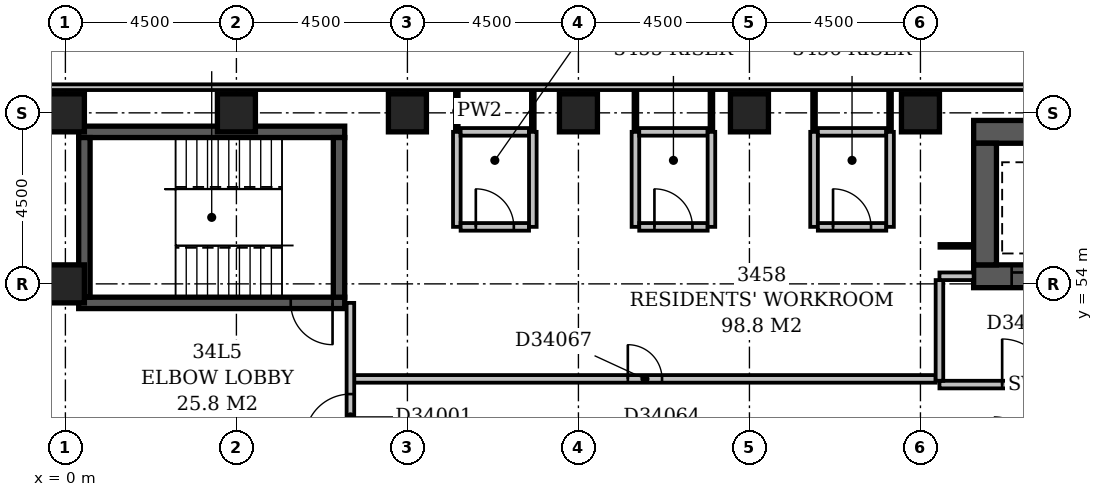
"""IFC4 building model, lengths in metres.
Left out: names, types, materials, properties, quantities, classifications, styles, units other than length and angle.
Written with IfcOpenShell. Run it as: python <this file> out.ifc"""

import sys

from ifc_helpers import new_model, si_unit, direction, frame, frame_2d, origin, origin_2d, place, context, subcontext, project, spatial, rectangle, extrude, element, fill, save


model = new_model("IFC4")
c1 = context("Model", 3, precision=1e-05, world=origin(), true_north=direction((0.0, 1.0)))
c2 = subcontext(c1, "Body", "Model", "MODEL_VIEW")
j1 = project(units=[si_unit("LENGTHUNIT", "METRE"), si_unit("PLANEANGLEUNIT", "RADIAN")], contexts=[c1])
p1 = place(None, origin())
s1 = spatial("IfcSite", under=j1, at=p1, CompositionType="ELEMENT")
p2 = place(p1, origin())
s2 = spatial("IfcBuilding", under=s1, at=p2, CompositionType="ELEMENT")
p3 = place(p2, frame((0.0, 0.0, 137.6)))
s3 = spatial("IfcBuildingStorey", under=s2, at=p3, CompositionType="ELEMENT", Elevation=137.6)
p4 = place(p3, frame((0.35, 53.5, -0.3), z_axis=(0.0, 0.0, 1.0), x_axis=(1.0, 0.0, 0.0)))
e1 = element("IfcWall", 1, at=p4, inside=s3, PredefinedType="SHEAR", context=c2, shape_type="SweptSolid", body=[
    extrude(rectangle(XDim=7.0, YDim=0.3, at=frame_2d((3.5, 0.0))), origin(), (0.0, 0.0, 1.0), 3.6),
])
p5 = place(p4, frame((5.58, 0.0, 0.3)))
e2 = element("IfcOpeningElement", 2, at=p5, cuts=e1, PredefinedType="OPENING", context=c2, shape_type="SweptSolid", body=[
    extrude(rectangle(XDim=1.1, YDim=2.1, at=frame_2d((0.55, 1.05))), frame((0.0, 0.162, 0.0), z_axis=(0.0, -1.0, 0.0), x_axis=(1.0, 0.0, 0.0)), (0.0, 0.0, 1.0), 0.324),
])
p6 = place(p3, frame((0.35, 58.0, -0.3), z_axis=(0.0, 0.0, 1.0), x_axis=(1.0, 0.0, 0.0)))
e3 = element("IfcWall", 3, at=p6, inside=s3, PredefinedType="SHEAR", context=c2, shape_type="SweptSolid", body=[
    extrude(rectangle(XDim=7.0, YDim=0.3, at=frame_2d((3.5, 0.0))), origin(), (0.0, 0.0, 1.0), 3.6),
])
for number, where, z_axis, x_axis in (
    (4, (0.5, 53.65, -0.3), (0.0, 0.0, 1.0), (0.0, 1.0, 0.0)),
    (5, (7.2, 53.65, -0.3), (0.0, 0.0, 1.0), (0.0, 1.0, 0.0)),
):
    element("IfcWall", number, at=place(p3, frame(where, z_axis=z_axis, x_axis=x_axis)), inside=s3, PredefinedType="SHEAR", context=c2, shape_type="SweptSolid", body=[
        extrude(rectangle(XDim=4.2, YDim=0.3, at=frame_2d((2.1, 0.0))), origin(), (0.0, 0.0, 1.0), 3.6),
    ])
p7 = place(p3, frame((23.9, 54.2, -0.3), z_axis=(0.0, 0.0, 1.0), x_axis=(1.0, 0.0, 0.0)))
e6 = element("IfcWall", 6, at=p7, inside=s3, PredefinedType="SHEAR", context=c2, shape_type="SweptSolid", body=[
    extrude(rectangle(XDim=3.1, YDim=0.6, at=frame_2d((1.55, 0.0))), origin(), (0.0, 0.0, 1.0), 3.6),
])
p8 = place(p7, frame((1.0, 0.0, 0.3)))
e7 = element("IfcOpeningElement", 7, at=p8, cuts=e6, PredefinedType="OPENING", context=c2, shape_type="SweptSolid", body=[
    extrude(rectangle(XDim=1.1, YDim=2.1, at=frame_2d((0.55, 1.05))), frame((0.0, 0.312, 0.0), z_axis=(0.0, -1.0, 0.0), x_axis=(1.0, 0.0, 0.0)), (0.0, 0.0, 1.0), 0.624),
])
p9 = place(p3, frame((23.9, 58.0, -0.3), z_axis=(0.0, 0.0, 1.0), x_axis=(1.0, 0.0, 0.0)))
e8 = element("IfcWall", 8, at=p9, inside=s3, PredefinedType="SHEAR", context=c2, shape_type="SweptSolid", body=[
    extrude(rectangle(XDim=3.1, YDim=0.6, at=frame_2d((1.55, 0.0))), origin(), (0.0, 0.0, 1.0), 3.6),
])
p10 = place(p3, frame((24.2, 54.5, -0.3), z_axis=(0.0, 0.0, 1.0), x_axis=(0.0, 1.0, 0.0)))
e9 = element("IfcWall", 9, at=p10, inside=s3, PredefinedType="SHEAR", context=c2, shape_type="SweptSolid", body=[
    extrude(rectangle(XDim=3.2, YDim=0.6, at=frame_2d((1.6, 0.0))), origin(), (0.0, 0.0, 1.0), 3.6),
])
for number, where, z_axis, x_axis in (
    (10, (0.0, 54.0, -0.3), (0.0, 0.0, 1.0), (1.0, 0.0, 0.0)),
    (11, (0.0, 58.5, -0.3), (0.0, 0.0, 1.0), (1.0, 0.0, 0.0)),
    (12, (4.5, 58.5, -0.3), (0.0, 0.0, 1.0), (1.0, 0.0, 0.0)),
    (13, (9.0, 58.5, -0.3), (0.0, 0.0, 1.0), (1.0, 0.0, 0.0)),
    (14, (13.5, 58.5, -0.3), (0.0, 0.0, 1.0), (1.0, 0.0, 0.0)),
    (15, (18.0, 58.5, -0.3), (0.0, 0.0, 1.0), (1.0, 0.0, 0.0)),
    (16, (22.5, 58.5, -0.3), (0.0, 0.0, 1.0), (1.0, 0.0, 0.0)),
):
    element("IfcColumn", number, at=place(p3, frame(where, z_axis=z_axis, x_axis=x_axis)), inside=s3, PredefinedType="COLUMN", context=c2, shape_type="SweptSolid", body=[
        extrude(rectangle(XDim=1.0, YDim=1.0, at=origin_2d()), origin(), (0.0, 0.0, 1.0), 3.6),
    ])
p11 = place(p3, frame((68.1, 59.175, 0.0), z_axis=(0.0, 0.0, 1.0), x_axis=(-1.0, 0.0, 0.0)))
e17 = element("IfcWall", 17, at=p11, inside=s3, PredefinedType="STANDARD", context=c2, shape_type="SweptSolid", body=[
    extrude(rectangle(XDim=68.85, YDim=0.15, at=frame_2d((34.425, 0.0))), origin(), (0.0, 0.0, 1.0), 2.7),
])
p12 = place(p11, frame((15.15, 0.0, 0.6)))
e18 = element("IfcOpeningElement", 18, at=p12, cuts=e17, PredefinedType="OPENING", context=c2, shape_type="SweptSolid", body=[
    extrude(rectangle(XDim=2.4, YDim=1.8, at=frame_2d((1.2, 0.9))), frame((0.0, 0.087, 0.0), z_axis=(0.0, -1.0, 0.0), x_axis=(1.0, 0.0, 0.0)), (0.0, 0.0, 1.0), 0.174),
])
p13 = place(p11, frame((19.65, 0.0, 0.6)))
e19 = element("IfcOpeningElement", 19, at=p13, cuts=e17, PredefinedType="OPENING", context=c2, shape_type="SweptSolid", body=[
    extrude(rectangle(XDim=2.4, YDim=1.8, at=frame_2d((1.2, 0.9))), frame((0.0, 0.087, 0.0), z_axis=(0.0, -1.0, 0.0), x_axis=(1.0, 0.0, 0.0)), (0.0, 0.0, 1.0), 0.174),
])
p14 = place(p11, frame((37.65, 0.0, 0.6)))
e20 = element("IfcOpeningElement", 20, at=p14, cuts=e17, PredefinedType="OPENING", context=c2, shape_type="SweptSolid", body=[
    extrude(rectangle(XDim=2.4, YDim=1.8, at=frame_2d((1.2, 0.9))), frame((0.0, 0.087, 0.0), z_axis=(0.0, -1.0, 0.0), x_axis=(1.0, 0.0, 0.0)), (0.0, 0.0, 1.0), 0.174),
])
p15 = place(p3, frame((23.0, 51.35, 0.0), z_axis=(0.0, 0.0, 1.0), x_axis=(1.0, 0.0, 0.0)))
e21 = element("IfcWall", 21, at=p15, inside=s3, PredefinedType="PARTITIONING", context=c2, shape_type="SweptSolid", body=[
    extrude(rectangle(XDim=4.8, YDim=0.2, at=frame_2d((2.4, 0.0))), origin(), (0.0, 0.0, 1.0), 3.3),
])
p16 = place(p15, frame((1.65, 0.0, 0.0)))
e22 = element("IfcOpeningElement", 22, at=p16, cuts=e21, PredefinedType="OPENING", context=c2, shape_type="SweptSolid", body=[
    extrude(rectangle(XDim=1.2, YDim=2.1, at=frame_2d((0.6, 1.05))), frame((0.0, 0.112, 0.0), z_axis=(0.0, -1.0, 0.0), x_axis=(1.0, 0.0, 0.0)), (0.0, 0.0, 1.0), 0.224),
])
p17 = place(p3, frame((23.0, 54.2, 0.0), z_axis=(0.0, 0.0, 1.0), x_axis=(1.0, 0.0, 0.0)))
e23 = element("IfcWall", 23, at=p17, inside=s3, PredefinedType="PARTITIONING", context=c2, shape_type="SweptSolid", body=[
    extrude(rectangle(XDim=0.9, YDim=0.2, at=frame_2d((0.45, 0.0))), origin(), (0.0, 0.0, 1.0), 3.3),
])
p18 = place(p3, frame((23.0, 51.45, 0.0), z_axis=(0.0, 0.0, 1.0), x_axis=(0.0, 1.0, 0.0)))
e24 = element("IfcWall", 24, at=p18, inside=s3, PredefinedType="PARTITIONING", context=c2, shape_type="SweptSolid", body=[
    extrude(rectangle(XDim=2.65, YDim=0.2, at=frame_2d((1.325, 0.0))), origin(), (0.0, 0.0, 1.0), 3.3),
])
p19 = place(p3, frame((7.5, 49.6, 0.0), z_axis=(0.0, 0.0, 1.0), x_axis=(0.0, 1.0, 0.0)))
e25 = element("IfcWall", 25, at=p19, inside=s3, PredefinedType="PARTITIONING", context=c2, shape_type="SweptSolid", body=[
    extrude(rectangle(XDim=3.9, YDim=0.2, at=frame_2d((1.95, 0.0))), origin(), (0.0, 0.0, 1.0), 3.3),
])
p20 = place(p19, frame((0.3, 0.0, 0.0)))
e26 = element("IfcOpeningElement", 26, at=p20, cuts=e25, PredefinedType="OPENING", context=c2, shape_type="SweptSolid", body=[
    extrude(rectangle(XDim=1.2, YDim=2.1, at=frame_2d((0.6, 1.05))), frame((0.0, 0.112, 0.0), z_axis=(0.0, -1.0, 0.0), x_axis=(1.0, 0.0, 0.0)), (0.0, 0.0, 1.0), 0.224),
])
p21 = place(p3, frame((7.6, 51.5, 0.0), z_axis=(0.0, 0.0, 1.0), x_axis=(1.0, 0.0, 0.0)))
e27 = element("IfcWall", 27, at=p21, inside=s3, PredefinedType="PARTITIONING", context=c2, shape_type="SweptSolid", body=[
    extrude(rectangle(XDim=15.3, YDim=0.2, at=frame_2d((7.65, 0.0))), origin(), (0.0, 0.0, 1.0), 3.3),
])
p22 = place(p21, frame((7.2, 0.0, 0.0)))
e28 = element("IfcOpeningElement", 28, at=p22, cuts=e27, PredefinedType="OPENING", context=c2, shape_type="SweptSolid", body=[
    extrude(rectangle(XDim=0.9, YDim=2.1, at=frame_2d((0.45, 1.05))), frame((0.0, 0.112, 0.0), z_axis=(0.0, -1.0, 0.0), x_axis=(1.0, 0.0, 0.0)), (0.0, 0.0, 1.0), 0.224),
])
p23 = place(p3, frame((23.0, 55.0, 0.0), z_axis=(0.0, 0.0, 1.0), x_axis=(1.0, 0.0, 0.0)))
e29 = element("IfcWall", 29, at=p23, inside=s3, PredefinedType="PARTITIONING", context=c2, shape_type="SweptSolid", body=[
    extrude(rectangle(XDim=0.9, YDim=0.1, at=frame_2d((0.45, 0.0))), origin(), (0.0, 0.0, 1.0), 3.3),
])
p24 = place(p3, frame((10.3, 55.5, 0.0), z_axis=(0.0, 0.0, 1.0), x_axis=(0.0, 1.0, 0.0)))
e30 = element("IfcWall", 30, at=p24, inside=s3, PredefinedType="PARTITIONING", context=c2, shape_type="SweptSolid", body=[
    extrude(rectangle(XDim=2.5, YDim=0.2, at=frame_2d((1.25, 0.0))), origin(), (0.0, 0.0, 1.0), 3.3),
])
p25 = place(p3, frame((10.4, 55.5, 0.0), z_axis=(0.0, 0.0, 1.0), x_axis=(1.0, 0.0, 0.0)))
e31 = element("IfcWall", 31, at=p25, inside=s3, PredefinedType="PARTITIONING", context=c2, shape_type="SweptSolid", body=[
    extrude(rectangle(XDim=1.8, YDim=0.2, at=frame_2d((0.9, 0.0))), origin(), (0.0, 0.0, 1.0), 3.3),
])
p26 = place(p25, frame((0.4, 0.0, 0.0)))
e32 = element("IfcOpeningElement", 32, at=p26, cuts=e31, PredefinedType="OPENING", context=c2, shape_type="SweptSolid", body=[
    extrude(rectangle(XDim=1.0, YDim=2.1, at=frame_2d((0.5, 1.05))), frame((0.0, 0.112, 0.0), z_axis=(0.0, -1.0, 0.0), x_axis=(1.0, 0.0, 0.0)), (0.0, 0.0, 1.0), 0.224),
])
for number, where, z_axis, x_axis in (
    (33, (12.3, 55.5, 0.0), (0.0, 0.0, 1.0), (0.0, 1.0, 0.0)),
    (34, (15.0, 55.5, 0.0), (0.0, 0.0, 1.0), (0.0, 1.0, 0.0)),
):
    element("IfcWall", number, at=place(p3, frame(where, z_axis=z_axis, x_axis=x_axis)), inside=s3, PredefinedType="PARTITIONING", context=c2, shape_type="SweptSolid", body=[
        extrude(rectangle(XDim=2.5, YDim=0.2, at=frame_2d((1.25, 0.0))), origin(), (0.0, 0.0, 1.0), 3.3),
    ])
p27 = place(p3, frame((15.1, 55.5, 0.0), z_axis=(0.0, 0.0, 1.0), x_axis=(1.0, 0.0, 0.0)))
e35 = element("IfcWall", 35, at=p27, inside=s3, PredefinedType="PARTITIONING", context=c2, shape_type="SweptSolid", body=[
    extrude(rectangle(XDim=1.8, YDim=0.2, at=frame_2d((0.9, 0.0))), origin(), (0.0, 0.0, 1.0), 3.3),
])
p28 = place(p27, frame((0.4, 0.0, 0.0)))
e36 = element("IfcOpeningElement", 36, at=p28, cuts=e35, PredefinedType="OPENING", context=c2, shape_type="SweptSolid", body=[
    extrude(rectangle(XDim=1.0, YDim=2.1, at=frame_2d((0.5, 1.05))), frame((0.0, 0.112, 0.0), z_axis=(0.0, -1.0, 0.0), x_axis=(1.0, 0.0, 0.0)), (0.0, 0.0, 1.0), 0.224),
])
for number, where, z_axis, x_axis in (
    (37, (17.0, 55.5, 0.0), (0.0, 0.0, 1.0), (0.0, 1.0, 0.0)),
    (38, (19.7, 55.5, 0.0), (0.0, 0.0, 1.0), (0.0, 1.0, 0.0)),
):
    element("IfcWall", number, at=place(p3, frame(where, z_axis=z_axis, x_axis=x_axis)), inside=s3, PredefinedType="PARTITIONING", context=c2, shape_type="SweptSolid", body=[
        extrude(rectangle(XDim=2.5, YDim=0.2, at=frame_2d((1.25, 0.0))), origin(), (0.0, 0.0, 1.0), 3.3),
    ])
p29 = place(p3, frame((19.8, 55.5, 0.0), z_axis=(0.0, 0.0, 1.0), x_axis=(1.0, 0.0, 0.0)))
e39 = element("IfcWall", 39, at=p29, inside=s3, PredefinedType="PARTITIONING", context=c2, shape_type="SweptSolid", body=[
    extrude(rectangle(XDim=1.8, YDim=0.2, at=frame_2d((0.9, 0.0))), origin(), (0.0, 0.0, 1.0), 3.3),
])
p30 = place(p29, frame((0.4, 0.0, 0.0)))
e40 = element("IfcOpeningElement", 40, at=p30, cuts=e39, PredefinedType="OPENING", context=c2, shape_type="SweptSolid", body=[
    extrude(rectangle(XDim=1.0, YDim=2.1, at=frame_2d((0.5, 1.05))), frame((0.0, 0.112, 0.0), z_axis=(0.0, -1.0, 0.0), x_axis=(1.0, 0.0, 0.0)), (0.0, 0.0, 1.0), 0.224),
])
p31 = place(p3, frame((21.7, 55.5, 0.0), z_axis=(0.0, 0.0, 1.0), x_axis=(0.0, 1.0, 0.0)))
e41 = element("IfcWall", 41, at=p31, inside=s3, PredefinedType="PARTITIONING", context=c2, shape_type="SweptSolid", body=[
    extrude(rectangle(XDim=2.5, YDim=0.2, at=frame_2d((1.25, 0.0))), origin(), (0.0, 0.0, 1.0), 3.3),
])
p32 = place(p3, frame((10.3, 58.0, 0.0), z_axis=(0.0, 0.0, 1.0), x_axis=(0.0, 1.0, 0.0)))
e42 = element("IfcWall", 42, at=p32, inside=s3, PredefinedType="PARTITIONING", context=c2, shape_type="SweptSolid", body=[
    extrude(rectangle(XDim=1.1, YDim=0.1, at=frame_2d((0.55, 0.0))), origin(), (0.0, 0.0, 1.0), 3.3),
])
p33 = place(p3, frame((10.4, 58.0, 0.0), z_axis=(0.0, 0.0, 1.0), x_axis=(1.0, 0.0, 0.0)))
e43 = element("IfcWall", 43, at=p33, inside=s3, PredefinedType="PARTITIONING", context=c2, shape_type="SweptSolid", body=[
    extrude(rectangle(XDim=1.8, YDim=0.2, at=frame_2d((0.9, 0.0))), origin(), (0.0, 0.0, 1.0), 3.3),
])
for number, where, z_axis, x_axis in (
    (44, (12.3, 58.0, 0.0), (0.0, 0.0, 1.0), (0.0, 1.0, 0.0)),
    (45, (15.0, 58.0, 0.0), (0.0, 0.0, 1.0), (0.0, 1.0, 0.0)),
):
    element("IfcWall", number, at=place(p3, frame(where, z_axis=z_axis, x_axis=x_axis)), inside=s3, PredefinedType="PARTITIONING", context=c2, shape_type="SweptSolid", body=[
        extrude(rectangle(XDim=1.1, YDim=0.1, at=frame_2d((0.55, 0.0))), origin(), (0.0, 0.0, 1.0), 3.3),
    ])
p34 = place(p3, frame((15.1, 58.0, 0.0), z_axis=(0.0, 0.0, 1.0), x_axis=(1.0, 0.0, 0.0)))
e46 = element("IfcWall", 46, at=p34, inside=s3, PredefinedType="PARTITIONING", context=c2, shape_type="SweptSolid", body=[
    extrude(rectangle(XDim=1.8, YDim=0.2, at=frame_2d((0.9, 0.0))), origin(), (0.0, 0.0, 1.0), 3.3),
])
for number, where, z_axis, x_axis in (
    (47, (17.0, 58.0, 0.0), (0.0, 0.0, 1.0), (0.0, 1.0, 0.0)),
    (48, (19.7, 58.0, 0.0), (0.0, 0.0, 1.0), (0.0, 1.0, 0.0)),
):
    element("IfcWall", number, at=place(p3, frame(where, z_axis=z_axis, x_axis=x_axis)), inside=s3, PredefinedType="PARTITIONING", context=c2, shape_type="SweptSolid", body=[
        extrude(rectangle(XDim=1.1, YDim=0.1, at=frame_2d((0.55, 0.0))), origin(), (0.0, 0.0, 1.0), 3.3),
    ])
p35 = place(p3, frame((19.8, 58.0, 0.0), z_axis=(0.0, 0.0, 1.0), x_axis=(1.0, 0.0, 0.0)))
e49 = element("IfcWall", 49, at=p35, inside=s3, PredefinedType="PARTITIONING", context=c2, shape_type="SweptSolid", body=[
    extrude(rectangle(XDim=1.8, YDim=0.2, at=frame_2d((0.9, 0.0))), origin(), (0.0, 0.0, 1.0), 3.3),
])
p36 = place(p3, frame((21.7, 58.0, 0.0), z_axis=(0.0, 0.0, 1.0), x_axis=(0.0, 1.0, 0.0)))
e50 = element("IfcWall", 50, at=p36, inside=s3, PredefinedType="PARTITIONING", context=c2, shape_type="SweptSolid", body=[
    extrude(rectangle(XDim=1.1, YDim=0.1, at=frame_2d((0.55, 0.0))), origin(), (0.0, 0.0, 1.0), 3.3),
])
p37 = place(p20, origin())
e51 = element("IfcDoor", 51, at=p37, inside=s3, OperationType="SINGLE_SWING_LEFT", PredefinedType="DOOR", context=c2, shape_type="SweptSolid", body=[
    extrude(rectangle(XDim=1.2, YDim=2.1, at=frame_2d((0.6, 1.05))), frame((0.0, 0.025, 0.0), z_axis=(0.0, -1.0, 0.0), x_axis=(1.0, 0.0, 0.0)), (0.0, 0.0, 1.0), 0.05),
])
fill(e26, e51)
p38 = place(p16, origin())
e52 = element("IfcDoor", 52, at=p38, inside=s3, OperationType="SINGLE_SWING_LEFT", PredefinedType="DOOR", context=c2, shape_type="SweptSolid", body=[
    extrude(rectangle(XDim=1.2, YDim=2.1, at=frame_2d((0.6, 1.05))), frame((0.0, 0.025, 0.0), z_axis=(0.0, -1.0, 0.0), x_axis=(1.0, 0.0, 0.0)), (0.0, 0.0, 1.0), 0.05),
])
fill(e22, e52)
p39 = place(p8, origin())
e53 = element("IfcDoor", 53, at=p39, inside=s3, OperationType="SLIDING_TO_LEFT", PredefinedType="DOOR", context=c2, shape_type="SweptSolid", body=[
    extrude(rectangle(XDim=1.1, YDim=2.1, at=frame_2d((0.55, 1.05))), frame((0.0, 0.025, 0.0), z_axis=(0.0, -1.0, 0.0), x_axis=(1.0, 0.0, 0.0)), (0.0, 0.0, 1.0), 0.05),
])
fill(e7, e53)
p40 = place(p5, origin())
e54 = element("IfcDoor", 54, at=p40, inside=s3, OperationType="SINGLE_SWING_RIGHT", PredefinedType="DOOR", context=c2, shape_type="SweptSolid", body=[
    extrude(rectangle(XDim=1.1, YDim=2.1, at=frame_2d((0.55, 1.05))), frame((0.0, 0.025, 0.0), z_axis=(0.0, -1.0, 0.0), x_axis=(1.0, 0.0, 0.0)), (0.0, 0.0, 1.0), 0.05),
])
fill(e2, e54)
p41 = place(p22, origin())
e55 = element("IfcDoor", 55, at=p41, inside=s3, OperationType="SINGLE_SWING_LEFT", PredefinedType="DOOR", context=c2, shape_type="SweptSolid", body=[
    extrude(rectangle(XDim=0.9, YDim=2.1, at=frame_2d((0.45, 1.05))), frame((0.0, 0.025, 0.0), z_axis=(0.0, -1.0, 0.0), x_axis=(1.0, 0.0, 0.0)), (0.0, 0.0, 1.0), 0.05),
])
fill(e28, e55)
p42 = place(p26, origin())
e56 = element("IfcDoor", 56, at=p42, inside=s3, OperationType="SINGLE_SWING_LEFT", PredefinedType="DOOR", context=c2, shape_type="SweptSolid", body=[
    extrude(rectangle(XDim=1.0, YDim=2.1, at=frame_2d((0.5, 1.05))), frame((0.0, 0.025, 0.0), z_axis=(0.0, -1.0, 0.0), x_axis=(1.0, 0.0, 0.0)), (0.0, 0.0, 1.0), 0.05),
])
fill(e32, e56)
p43 = place(p28, origin())
e57 = element("IfcDoor", 57, at=p43, inside=s3, OperationType="SINGLE_SWING_LEFT", PredefinedType="DOOR", context=c2, shape_type="SweptSolid", body=[
    extrude(rectangle(XDim=1.0, YDim=2.1, at=frame_2d((0.5, 1.05))), frame((0.0, 0.025, 0.0), z_axis=(0.0, -1.0, 0.0), x_axis=(1.0, 0.0, 0.0)), (0.0, 0.0, 1.0), 0.05),
])
fill(e36, e57)
p44 = place(p30, origin())
e58 = element("IfcDoor", 58, at=p44, inside=s3, OperationType="SINGLE_SWING_LEFT", PredefinedType="DOOR", context=c2, shape_type="SweptSolid", body=[
    extrude(rectangle(XDim=1.0, YDim=2.1, at=frame_2d((0.5, 1.05))), frame((0.0, 0.025, 0.0), z_axis=(0.0, -1.0, 0.0), x_axis=(1.0, 0.0, 0.0)), (0.0, 0.0, 1.0), 0.05),
])
fill(e40, e58)
save(model, sys.argv[1])
